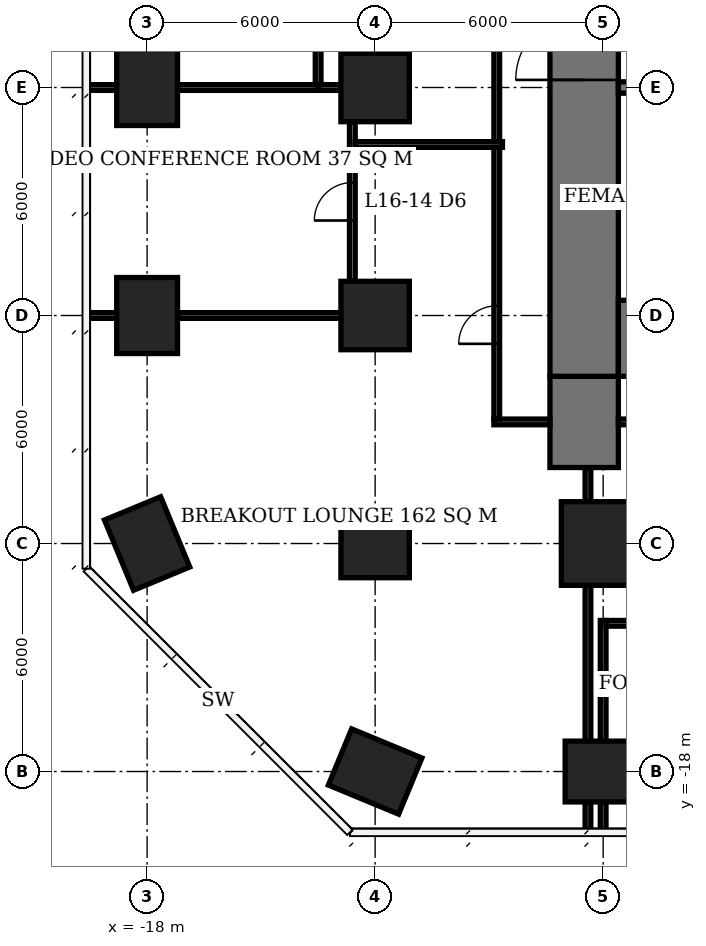
"""IFC4 building model, lengths in metres.
Left out: names, types, materials, properties, quantities, classifications, styles, units other than length and angle.
Written with IfcOpenShell. Run it as: python <this file> out.ifc"""

import sys

from ifc_helpers import new_model, si_unit, direction, frame, frame_2d, origin, origin_2d, place, context, subcontext, project, spatial, rectangle, extrude, element, fill, save


model = new_model("IFC4")
c1 = context("Model", 3, precision=1e-05, world=origin(), true_north=direction((0.0, 1.0)))
c2 = subcontext(c1, "Body", "Model", "MODEL_VIEW")
j1 = project(units=[si_unit("LENGTHUNIT", "METRE"), si_unit("PLANEANGLEUNIT", "RADIAN")], contexts=[c1])
p1 = place(None, origin())
s1 = spatial("IfcSite", under=j1, at=p1, CompositionType="ELEMENT")
p2 = place(p1, origin())
s2 = spatial("IfcBuilding", under=s1, at=p2, CompositionType="ELEMENT")
p3 = place(p2, frame((0.0, 0.0, 68.9)))
s3 = spatial("IfcBuildingStorey", under=s2, at=p3, CompositionType="ELEMENT", Elevation=68.9)
for number, where, z_axis, x_axis in (
    (1, (-18.0, -12.0, 0.0), (0.0, 0.0, 1.0), (-0.383, 0.924, 0.0)),
    (2, (-18.0, -6.0, 0.0), (0.0, 0.0, 1.0), (0.0, 1.0, 0.0)),
    (3, (-18.0, 0.0, 0.0), (0.0, 0.0, 1.0), (0.0, 1.0, 0.0)),
    (4, (-12.0, -18.0, 0.0), (0.0, 0.0, 1.0), (-0.924, 0.383, 0.0)),
):
    element("IfcColumn", number, at=place(p3, frame(where, z_axis=z_axis, x_axis=x_axis)), inside=s3, PredefinedType="COLUMN", context=c2, shape_type="SweptSolid", body=[
        extrude(rectangle(XDim=2.0, YDim=1.6, at=origin_2d()), origin(), (0.0, 0.0, 1.0), 3.9),
    ])
for number, where, z_axis, x_axis in (
    (5, (-12.0, -12.0, 0.0), (0.0, 0.0, 1.0), (1.0, 0.0, 0.0)),
    (6, (-12.0, -6.0, 0.0), (0.0, 0.0, 1.0), (1.0, 0.0, 0.0)),
    (7, (-12.0, 0.0, 0.0), (0.0, 0.0, 1.0), (1.0, 0.0, 0.0)),
):
    element("IfcColumn", number, at=place(p3, frame(where, z_axis=z_axis, x_axis=x_axis)), inside=s3, PredefinedType="COLUMN", context=c2, shape_type="SweptSolid", body=[
        extrude(rectangle(XDim=1.8, YDim=1.8, at=origin_2d()), origin(), (0.0, 0.0, 1.0), 3.9),
    ])
p4 = place(p3, frame((-6.0, -18.0, 0.0), z_axis=(0.0, 0.0, 1.0), x_axis=(1.0, 0.0, 0.0)))
e8 = element("IfcColumn", 8, at=p4, inside=s3, PredefinedType="COLUMN", context=c2, shape_type="SweptSolid", body=[
    extrude(rectangle(XDim=2.0, YDim=1.6, at=origin_2d()), origin(), (0.0, 0.0, 1.0), 3.9),
])
p5 = place(p3, frame((-6.0, -12.0, 0.0), z_axis=(0.0, 0.0, 1.0), x_axis=(1.0, 0.0, 0.0)))
e9 = element("IfcColumn", 9, at=p5, inside=s3, PredefinedType="COLUMN", context=c2, shape_type="SweptSolid", body=[
    extrude(rectangle(XDim=2.2, YDim=2.2, at=origin_2d()), origin(), (0.0, 0.0, 1.0), 3.9),
])
p6 = place(p3, frame((-5.6, -6.6, 0.0), z_axis=(0.0, 0.0, 1.0), x_axis=(1.0, 0.0, 0.0)))
e10 = element("IfcWall", 10, at=p6, inside=s3, PredefinedType="SHEAR", context=c2, shape_type="SweptSolid", body=[
    extrude(rectangle(XDim=23.2, YDim=2.0, at=frame_2d((11.6, 0.0))), origin(), (0.0, 0.0, 1.0), 3.9),
])
p7 = place(p3, frame((-6.5, -7.6, 0.0), z_axis=(0.0, 0.0, 1.0), x_axis=(0.0, 1.0, 0.0)))
e11 = element("IfcWall", 11, at=p7, inside=s3, PredefinedType="SHEAR", context=c2, shape_type="SweptSolid", body=[
    extrude(rectangle(XDim=21.2, YDim=1.8, at=frame_2d((10.6, 0.0))), origin(), (0.0, 0.0, 1.0), 3.9),
])
p8 = place(p7, frame((7.8, 0.0, 0.0)))
e12 = element("IfcOpeningElement", 12, at=p8, cuts=e11, PredefinedType="OPENING", context=c2, shape_type="SweptSolid", body=[
    extrude(rectangle(XDim=1.8, YDim=2.4, at=frame_2d((0.9, 1.2))), frame((0.0, 0.91, 0.0), z_axis=(0.0, -1.0, 0.0), x_axis=(1.0, 0.0, 0.0)), (0.0, 0.0, 1.0), 1.82),
])
p9 = place(p3, frame((-6.5, -10.0, 0.0), z_axis=(0.0, 0.0, 1.0), x_axis=(0.0, 1.0, 0.0)))
e13 = element("IfcWall", 13, at=p9, inside=s3, PredefinedType="SHEAR", context=c2, shape_type="SweptSolid", body=[
    extrude(rectangle(XDim=2.4, YDim=1.8, at=frame_2d((1.2, 0.0))), origin(), (0.0, 0.0, 1.0), 3.9),
])
p10 = place(p3, frame((-5.6, 0.0, 0.0), z_axis=(0.0, 0.0, 1.0), x_axis=(1.0, 0.0, 0.0)))
e14 = element("IfcWall", 14, at=p10, inside=s3, PredefinedType="SHEAR", context=c2, shape_type="SweptSolid", body=[
    extrude(rectangle(XDim=17.75, YDim=0.3, at=frame_2d((8.875, 0.0))), origin(), (0.0, 0.0, 1.0), 3.9),
])
p11 = place(p10, frame((0.6, 0.0, 0.0)))
e15 = element("IfcOpeningElement", 15, at=p11, cuts=e14, PredefinedType="OPENING", context=c2, shape_type="SweptSolid", body=[
    extrude(rectangle(XDim=0.9, YDim=2.1, at=frame_2d((0.45, 1.05))), frame((0.0, 0.16, 0.0), z_axis=(0.0, -1.0, 0.0), x_axis=(1.0, 0.0, 0.0)), (0.0, 0.0, 1.0), 0.32),
])
p12 = place(p10, frame((3.7, 0.0, 0.0)))
e16 = element("IfcOpeningElement", 16, at=p12, cuts=e14, PredefinedType="OPENING", context=c2, shape_type="SweptSolid", body=[
    extrude(rectangle(XDim=1.0, YDim=2.1, at=frame_2d((0.5, 1.05))), frame((0.0, 0.16, 0.0), z_axis=(0.0, -1.0, 0.0), x_axis=(1.0, 0.0, 0.0)), (0.0, 0.0, 1.0), 0.32),
])
p13 = place(p3, frame((-5.925, -14.1, 0.0), z_axis=(0.0, 0.0, 1.0), x_axis=(1.0, 0.0, 0.0)))
e17 = element("IfcWall", 17, at=p13, inside=s3, PredefinedType="PARTITIONING", context=c2, shape_type="SweptSolid", body=[
    extrude(rectangle(XDim=5.85, YDim=0.15, at=frame_2d((2.925, 0.0))), origin(), (0.0, 0.0, 1.0), 3.65),
])
p14 = place(p13, frame((2.425, 0.0, 0.0)))
e18 = element("IfcOpeningElement", 18, at=p14, cuts=e17, PredefinedType="OPENING", context=c2, shape_type="SweptSolid", body=[
    extrude(rectangle(XDim=1.0, YDim=2.1, at=frame_2d((0.5, 1.05))), frame((0.0, 0.085, 0.0), z_axis=(0.0, -1.0, 0.0), x_axis=(1.0, 0.0, 0.0)), (0.0, 0.0, 1.0), 0.17),
])
p15 = place(p3, frame((-19.6, -6.0, 0.0), z_axis=(0.0, 0.0, 1.0), x_axis=(1.0, 0.0, 0.0)))
e19 = element("IfcWall", 19, at=p15, inside=s3, PredefinedType="PARTITIONING", context=c2, shape_type="SweptSolid", body=[
    extrude(rectangle(XDim=0.8, YDim=0.15, at=frame_2d((0.4, 0.0))), origin(), (0.0, 0.0, 1.0), 3.65),
])
p16 = place(p3, frame((-17.2, -6.0, 0.0), z_axis=(0.0, 0.0, 1.0), x_axis=(1.0, 0.0, 0.0)))
e20 = element("IfcWall", 20, at=p16, inside=s3, PredefinedType="PARTITIONING", context=c2, shape_type="SweptSolid", body=[
    extrude(rectangle(XDim=4.3, YDim=0.15, at=frame_2d((2.15, 0.0))), origin(), (0.0, 0.0, 1.0), 3.65),
])
p17 = place(p3, frame((-19.6, 0.0, 0.0), z_axis=(0.0, 0.0, 1.0), x_axis=(1.0, 0.0, 0.0)))
e21 = element("IfcWall", 21, at=p17, inside=s3, PredefinedType="PARTITIONING", context=c2, shape_type="SweptSolid", body=[
    extrude(rectangle(XDim=0.8, YDim=0.15, at=frame_2d((0.4, 0.0))), origin(), (0.0, 0.0, 1.0), 3.65),
])
p18 = place(p3, frame((-17.2, 0.0, 0.0), z_axis=(0.0, 0.0, 1.0), x_axis=(1.0, 0.0, 0.0)))
e22 = element("IfcWall", 22, at=p18, inside=s3, PredefinedType="PARTITIONING", context=c2, shape_type="SweptSolid", body=[
    extrude(rectangle(XDim=3.775, YDim=0.15, at=frame_2d((1.887, 0.0))), origin(), (0.0, 0.0, 1.0), 3.65),
])
p19 = place(p3, frame((-13.5, 0.0, 0.0), z_axis=(0.0, 0.0, 1.0), x_axis=(1.0, 0.0, 0.0)))
e23 = element("IfcWall", 23, at=p19, inside=s3, PredefinedType="PARTITIONING", context=c2, shape_type="SweptSolid", body=[
    extrude(rectangle(XDim=0.6, YDim=0.15, at=frame_2d((0.3, 0.0))), origin(), (0.0, 0.0, 1.0), 3.65),
])
p20 = place(p3, frame((-13.5, 0.075, 0.0), z_axis=(0.0, 0.0, 1.0), x_axis=(0.0, 1.0, 0.0)))
e24 = element("IfcWall", 24, at=p20, inside=s3, PredefinedType="PARTITIONING", context=c2, shape_type="SweptSolid", body=[
    extrude(rectangle(XDim=5.85, YDim=0.15, at=frame_2d((2.925, 0.0))), origin(), (0.0, 0.0, 1.0), 3.65),
])
p21 = place(p20, frame((2.425, 0.0, 0.0)))
e25 = element("IfcOpeningElement", 25, at=p21, cuts=e24, PredefinedType="OPENING", context=c2, shape_type="SweptSolid", body=[
    extrude(rectangle(XDim=1.0, YDim=2.1, at=frame_2d((0.5, 1.05))), frame((0.0, 0.085, 0.0), z_axis=(0.0, -1.0, 0.0), x_axis=(1.0, 0.0, 0.0)), (0.0, 0.0, 1.0), 0.17),
])
p22 = place(p3, frame((-12.6, -5.1, 0.0), z_axis=(0.0, 0.0, 1.0), x_axis=(0.0, 1.0, 0.0)))
e26 = element("IfcWall", 26, at=p22, inside=s3, PredefinedType="PARTITIONING", context=c2, shape_type="SweptSolid", body=[
    extrude(rectangle(XDim=4.2, YDim=0.15, at=frame_2d((2.1, 0.0))), origin(), (0.0, 0.0, 1.0), 3.65),
])
p23 = place(p22, frame((1.6, 0.0, 0.0)))
e27 = element("IfcOpeningElement", 27, at=p23, cuts=e26, PredefinedType="OPENING", context=c2, shape_type="SweptSolid", body=[
    extrude(rectangle(XDim=1.0, YDim=2.1, at=frame_2d((0.5, 1.05))), frame((0.0, 0.085, 0.0), z_axis=(0.0, -1.0, 0.0), x_axis=(1.0, 0.0, 0.0)), (0.0, 0.0, 1.0), 0.17),
])
p24 = place(p3, frame((-6.0, -19.6, 0.0), z_axis=(0.0, 0.0, 1.0), x_axis=(0.0, 1.0, 0.0)))
e28 = element("IfcWall", 28, at=p24, inside=s3, PredefinedType="PARTITIONING", context=c2, shape_type="SweptSolid", body=[
    extrude(rectangle(XDim=0.8, YDim=0.15, at=frame_2d((0.4, 0.0))), origin(), (0.0, 0.0, 1.0), 3.65),
])
p25 = place(p3, frame((-6.0, -17.2, 0.0), z_axis=(0.0, 0.0, 1.0), x_axis=(0.0, 1.0, 0.0)))
e29 = element("IfcWall", 29, at=p25, inside=s3, PredefinedType="PARTITIONING", context=c2, shape_type="SweptSolid", body=[
    extrude(rectangle(XDim=3.175, YDim=0.15, at=frame_2d((1.587, 0.0))), origin(), (0.0, 0.0, 1.0), 3.65),
])
p26 = place(p3, frame((-12.525, -1.5, 0.0), z_axis=(0.0, 0.0, 1.0), x_axis=(1.0, 0.0, 0.0)))
e30 = element("IfcWall", 30, at=p26, inside=s3, PredefinedType="PARTITIONING", context=c2, shape_type="SweptSolid", body=[
    extrude(rectangle(XDim=3.875, YDim=0.15, at=frame_2d((1.938, 0.0))), origin(), (0.0, 0.0, 1.0), 3.65),
])
p27 = place(p3, frame((-8.8, -8.725, 0.0), z_axis=(0.0, 0.0, 1.0), x_axis=(0.0, 1.0, 0.0)))
e31 = element("IfcWall", 31, at=p27, inside=s3, PredefinedType="PARTITIONING", context=c2, shape_type="SweptSolid", body=[
    extrude(rectangle(XDim=7.15, YDim=0.15, at=frame_2d((3.575, 0.0))), origin(), (0.0, 0.0, 1.0), 3.65),
])
p28 = place(p27, frame((1.98, 0.0, 0.0)))
e32 = element("IfcOpeningElement", 32, at=p28, cuts=e31, PredefinedType="OPENING", context=c2, shape_type="SweptSolid", body=[
    extrude(rectangle(XDim=1.0, YDim=2.1, at=frame_2d((0.5, 1.05))), frame((0.0, 0.085, 0.0), z_axis=(0.0, -1.0, 0.0), x_axis=(1.0, 0.0, 0.0)), (0.0, 0.0, 1.0), 0.17),
])
p29 = place(p3, frame((-8.875, -8.8, 0.0), z_axis=(0.0, 0.0, 1.0), x_axis=(1.0, 0.0, 0.0)))
e33 = element("IfcWall", 33, at=p29, inside=s3, PredefinedType="PARTITIONING", context=c2, shape_type="SweptSolid", body=[
    extrude(rectangle(XDim=1.475, YDim=0.15, at=frame_2d((0.738, 0.0))), origin(), (0.0, 0.0, 1.0), 3.65),
])
p30 = place(p3, frame((-8.8, -1.425, 0.0), z_axis=(0.0, 0.0, 1.0), x_axis=(0.0, 1.0, 0.0)))
e34 = element("IfcWall", 34, at=p30, inside=s3, PredefinedType="PARTITIONING", context=c2, shape_type="SweptSolid", body=[
    extrude(rectangle(XDim=11.85, YDim=0.15, at=frame_2d((5.925, 0.0))), origin(), (0.0, 0.0, 1.0), 3.65),
])
p31 = place(p30, frame((3.625, 0.0, 0.0)))
e35 = element("IfcOpeningElement", 35, at=p31, cuts=e34, PredefinedType="OPENING", context=c2, shape_type="SweptSolid", body=[
    extrude(rectangle(XDim=1.0, YDim=2.1, at=frame_2d((0.5, 1.05))), frame((0.0, 0.085, 0.0), z_axis=(0.0, -1.0, 0.0), x_axis=(1.0, 0.0, 0.0)), (0.0, 0.0, 1.0), 0.17),
])
p32 = place(p3, frame((-6.4, -19.55, 0.0), z_axis=(0.0, 0.0, 1.0), x_axis=(0.0, 1.0, 0.0)))
e36 = element("IfcWall", 36, at=p32, inside=s3, PredefinedType="PARTITIONING", context=c2, shape_type="SweptSolid", body=[
    extrude(rectangle(XDim=0.75, YDim=0.15, at=frame_2d((0.375, 0.0))), origin(), (0.0, 0.0, 1.0), 3.65),
])
p33 = place(p3, frame((-6.4, -17.2, 0.0), z_axis=(0.0, 0.0, 1.0), x_axis=(0.0, 1.0, 0.0)))
e37 = element("IfcWall", 37, at=p33, inside=s3, PredefinedType="PARTITIONING", context=c2, shape_type="SweptSolid", body=[
    extrude(rectangle(XDim=4.1, YDim=0.15, at=frame_2d((2.05, 0.0))), origin(), (0.0, 0.0, 1.0), 3.65),
])
p34 = place(p3, frame((-6.4, -10.9, 0.0), z_axis=(0.0, 0.0, 1.0), x_axis=(0.0, 1.0, 0.0)))
e38 = element("IfcWall", 38, at=p34, inside=s3, PredefinedType="PARTITIONING", context=c2, shape_type="SweptSolid", body=[
    extrude(rectangle(XDim=0.9, YDim=0.15, at=frame_2d((0.45, 0.0))), origin(), (0.0, 0.0, 1.0), 3.65),
])
p35 = place(p3, frame((-5.6, -8.8, 0.0), z_axis=(0.0, 0.0, 1.0), x_axis=(1.0, 0.0, 0.0)))
e39 = element("IfcWall", 39, at=p35, inside=s3, PredefinedType="PARTITIONING", context=c2, shape_type="SweptSolid", body=[
    extrude(rectangle(XDim=23.2, YDim=0.15, at=frame_2d((11.6, 0.0))), origin(), (0.0, 0.0, 1.0), 3.65),
])
p36 = place(p35, frame((7.62, 0.0, 0.0)))
e40 = element("IfcOpeningElement", 40, at=p36, cuts=e39, PredefinedType="OPENING", context=c2, shape_type="SweptSolid", body=[
    extrude(rectangle(XDim=1.0, YDim=2.1, at=frame_2d((0.5, 1.05))), frame((0.0, 0.085, 0.0), z_axis=(0.0, -1.0, 0.0), x_axis=(1.0, 0.0, 0.0)), (0.0, 0.0, 1.0), 0.17),
])
p37 = place(p8, origin())
e41 = element("IfcDoor", 41, at=p37, inside=s3, OperationType="DOUBLE_DOOR_SINGLE_SWING", PredefinedType="DOOR", context=c2, shape_type="SweptSolid", body=[
    extrude(rectangle(XDim=1.8, YDim=2.4, at=frame_2d((0.9, 1.2))), frame((0.0, 0.025, 0.0), z_axis=(0.0, -1.0, 0.0), x_axis=(1.0, 0.0, 0.0)), (0.0, 0.0, 1.0), 0.05),
])
fill(e12, e41)
p38 = place(p23, origin())
e42 = element("IfcDoor", 42, at=p38, inside=s3, OperationType="SINGLE_SWING_LEFT", PredefinedType="DOOR", context=c2, shape_type="SweptSolid", body=[
    extrude(rectangle(XDim=1.0, YDim=2.1, at=frame_2d((0.5, 1.05))), frame((0.0, 0.025, 0.0), z_axis=(0.0, -1.0, 0.0), x_axis=(1.0, 0.0, 0.0)), (0.0, 0.0, 1.0), 0.05),
])
fill(e27, e42)
p39 = place(p28, origin())
e43 = element("IfcDoor", 43, at=p39, inside=s3, OperationType="SINGLE_SWING_LEFT", PredefinedType="DOOR", context=c2, shape_type="SweptSolid", body=[
    extrude(rectangle(XDim=1.0, YDim=2.1, at=frame_2d((0.5, 1.05))), frame((0.0, 0.025, 0.0), z_axis=(0.0, -1.0, 0.0), x_axis=(1.0, 0.0, 0.0)), (0.0, 0.0, 1.0), 0.05),
])
fill(e32, e43)
save(model, sys.argv[1])
